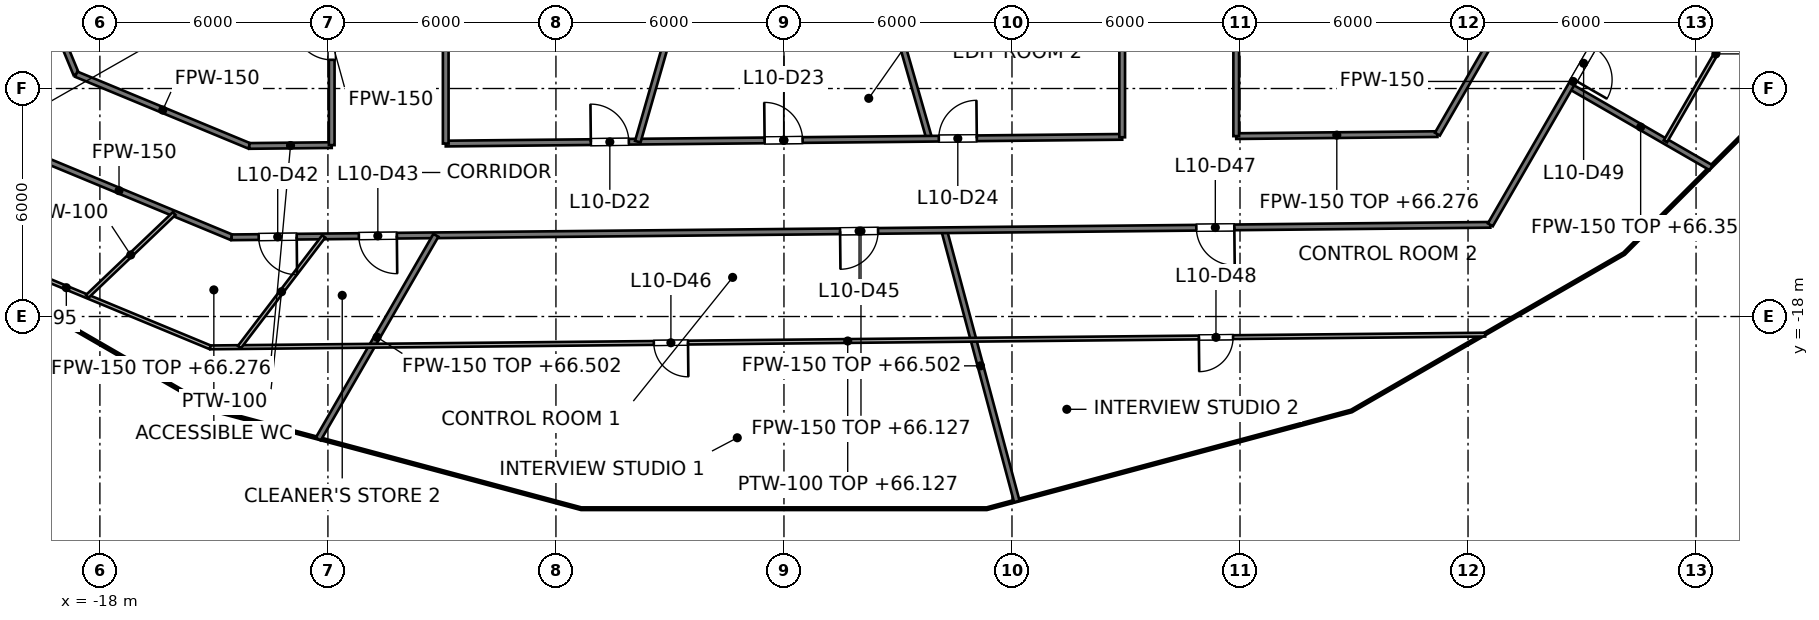
"""IFC4 building model, lengths in metres.
Left out: names, types, materials, properties, quantities, classifications, styles, units other than length and angle.
Written with IfcOpenShell. Run it as: python <this file> out.ifc"""

import sys

from ifc_helpers import new_model, si_unit, direction, frame, frame_2d, origin, place, context, subcontext, project, spatial, rectangle, extrude, element, fill, save


model = new_model("IFC4")
c1 = context("Model", 3, precision=1e-05, world=origin(), true_north=direction((0.0, 1.0)))
c2 = subcontext(c1, "Body", "Model", "MODEL_VIEW")
j1 = project(units=[si_unit("LENGTHUNIT", "METRE"), si_unit("PLANEANGLEUNIT", "RADIAN")], contexts=[c1])
p1 = place(None, origin())
s1 = spatial("IfcSite", under=j1, at=p1, CompositionType="ELEMENT")
p2 = place(p1, origin())
s2 = spatial("IfcBuilding", under=s1, at=p2, CompositionType="ELEMENT")
p3 = place(p2, frame((0.0, 0.0, 63.0)))
s3 = spatial("IfcBuildingStorey", under=s2, at=p3, CompositionType="ELEMENT", Elevation=63.0)
p4 = place(p3, frame((4.215, -15.73, 0.0), z_axis=(0.0, 0.0, 1.0), x_axis=(0.258791697498, -0.965933153643, 0.0)))
e1 = element("IfcWall", 1, at=p4, inside=s3, PredefinedType="PARTITIONING", context=c2, shape_type="SweptSolid", body=[
    extrude(rectangle(XDim=7.388, YDim=0.15, at=frame_2d((3.694, 0.0))), origin(), (0.0, 0.0, 1.0), 3.502),
])
p5 = place(p3, frame((2.296, -8.0, 0.0), z_axis=(0.0, 0.0, 1.0), x_axis=(0.275935525478, -0.961176147113, 0.0)))
e2 = element("IfcWall", 2, at=p5, inside=s3, PredefinedType="PARTITIONING", context=c2, shape_type="SweptSolid", body=[
    extrude(rectangle(XDim=5.548, YDim=0.15, at=frame_2d((2.774, 0.0))), origin(), (0.0, 0.0, 1.0), 4.05),
])
p6 = place(p3, frame((-20.5, -7.095, 0.0), z_axis=(0.0, 0.0, 1.0), x_axis=(0.382878184095, -0.923798839653, 0.0)))
e3 = element("IfcWall", 3, at=p6, inside=s3, PredefinedType="PARTITIONING", context=c2, shape_type="SweptSolid", body=[
    extrude(rectangle(XDim=4.902, YDim=0.15, at=frame_2d((2.451, 0.0))), origin(), (0.0, 0.0, 1.0), 3.276),
])
p7 = place(p3, frame((20.69, -11.945, 0.0), z_axis=(0.0, 0.0, 1.0), x_axis=(0.866028755976, -0.499994193788, 0.0)))
e4 = element("IfcWall", 4, at=p7, inside=s3, PredefinedType="PARTITIONING", context=c2, shape_type="SweptSolid", body=[
    extrude(rectangle(XDim=4.277, YDim=0.15, at=frame_2d((2.139, 0.0))), origin(), (0.0, 0.0, 1.0), 3.352),
])
p8 = place(p3, frame((-20.46, -13.46, 0.0), z_axis=(0.0, 0.0, 1.0), x_axis=(0.923801547606, -0.382871650349, 0.0)))
e5 = element("IfcWall", 5, at=p8, inside=s3, PredefinedType="PARTITIONING", context=c2, shape_type="SweptSolid", body=[
    extrude(rectangle(XDim=6.415, YDim=0.15, at=frame_2d((3.208, 0.0))), origin(), (0.0, 0.0, 1.0), 3.195),
])
p9 = place(p3, frame((-18.623, -11.623, 0.0), z_axis=(0.0, 0.0, 1.0), x_axis=(0.923816441303, -0.382835712518, 0.0)))
e6 = element("IfcWall", 6, at=p9, inside=s3, PredefinedType="PARTITIONING", context=c2, shape_type="SweptSolid", body=[
    extrude(rectangle(XDim=4.931, YDim=0.15, at=frame_2d((2.465, 0.0))), origin(), (0.0, 0.0, 1.0), 3.195),
])
p10 = place(p3, frame((-14.534, -15.916, 0.0), z_axis=(0.0, 0.0, 1.0), x_axis=(0.999950637767, 0.009935896005, 0.0)))
e7 = element("IfcWall", 7, at=p10, inside=s3, PredefinedType="PARTITIONING", context=c2, shape_type="SweptSolid", body=[
    extrude(rectangle(XDim=33.123, YDim=0.15, at=frame_2d((16.561, 0.0))), origin(), (0.0, 0.0, 1.0), 3.127),
])
p11 = place(p10, frame((0.713, 0.0, 0.0)))
e8 = element("IfcOpeningElement", 8, at=p11, cuts=e7, PredefinedType="OPENING", context=c2, shape_type="SweptSolid", body=[
    extrude(rectangle(XDim=1.0, YDim=2.1, at=frame_2d((0.5, 1.05))), frame((0.0, 0.075, 0.0), z_axis=(0.0, -1.0, 0.0), x_axis=(1.0, 0.0, 0.0)), (0.0, 0.0, 1.0), 0.15),
])
p12 = place(p10, frame((3.348, 0.0, 0.0)))
e9 = element("IfcOpeningElement", 9, at=p12, cuts=e7, PredefinedType="OPENING", context=c2, shape_type="SweptSolid", body=[
    extrude(rectangle(XDim=1.0, YDim=2.1, at=frame_2d((0.5, 1.05))), frame((0.0, 0.075, 0.0), z_axis=(0.0, -1.0, 0.0), x_axis=(1.0, 0.0, 0.0)), (0.0, 0.0, 1.0), 0.15),
])
p13 = place(p10, frame((16.011, 0.0, 0.0)))
e10 = element("IfcOpeningElement", 10, at=p13, cuts=e7, PredefinedType="OPENING", context=c2, shape_type="SweptSolid", body=[
    extrude(rectangle(XDim=1.0, YDim=2.1, at=frame_2d((0.5, 1.05))), frame((0.0, 0.075, 0.0), z_axis=(0.0, -1.0, 0.0), x_axis=(1.0, 0.0, 0.0)), (0.0, 0.0, 1.0), 0.15),
])
p14 = place(p10, frame((25.386, 0.0, 0.0)))
e11 = element("IfcOpeningElement", 11, at=p14, cuts=e7, PredefinedType="OPENING", context=c2, shape_type="SweptSolid", body=[
    extrude(rectangle(XDim=1.0, YDim=2.1, at=frame_2d((0.5, 1.05))), frame((0.0, 0.075, 0.0), z_axis=(0.0, -1.0, 0.0), x_axis=(1.0, 0.0, 0.0)), (0.0, 0.0, 1.0), 0.15),
])
p15 = place(p3, frame((-14.068, -13.511, 0.0), z_axis=(0.0, 0.0, 1.0), x_axis=(0.999950911515, 0.009908307647, 0.0)))
e12 = element("IfcWall", 12, at=p15, inside=s3, PredefinedType="PARTITIONING", context=c2, shape_type="SweptSolid", body=[
    extrude(rectangle(XDim=2.168, YDim=0.15, at=frame_2d((1.084, 0.0))), origin(), (0.0, 0.0, 1.0), 3.276),
])
p16 = place(p3, frame((-8.9, -13.449, 0.0), z_axis=(0.0, 0.0, 1.0), x_axis=(0.999950697987, 0.009929833562, 0.0)))
e13 = element("IfcWall", 13, at=p16, inside=s3, PredefinedType="PARTITIONING", context=c2, shape_type="SweptSolid", body=[
    extrude(rectangle(XDim=17.801, YDim=0.15, at=frame_2d((8.9, 0.0))), origin(), (0.0, 0.0, 1.0), 3.127),
])
p17 = place(p16, frame((3.818, 0.0, 0.0)))
e14 = element("IfcOpeningElement", 14, at=p17, cuts=e13, PredefinedType="OPENING", context=c2, shape_type="SweptSolid", body=[
    extrude(rectangle(XDim=1.0, YDim=2.1, at=frame_2d((0.5, 1.05))), frame((0.0, 0.075, 0.0), z_axis=(0.0, -1.0, 0.0), x_axis=(1.0, 0.0, 0.0)), (0.0, 0.0, 1.0), 0.15),
])
p18 = place(p16, frame((8.391, 0.0, 0.0)))
e15 = element("IfcOpeningElement", 15, at=p18, cuts=e13, PredefinedType="OPENING", context=c2, shape_type="SweptSolid", body=[
    extrude(rectangle(XDim=1.0, YDim=2.1, at=frame_2d((0.5, 1.05))), frame((0.0, 0.075, 0.0), z_axis=(0.0, -1.0, 0.0), x_axis=(1.0, 0.0, 0.0)), (0.0, 0.0, 1.0), 0.15),
])
p19 = place(p16, frame((12.975, 0.0, 0.0)))
e16 = element("IfcOpeningElement", 16, at=p19, cuts=e13, PredefinedType="OPENING", context=c2, shape_type="SweptSolid", body=[
    extrude(rectangle(XDim=1.0, YDim=2.1, at=frame_2d((0.5, 1.05))), frame((0.0, 0.075, 0.0), z_axis=(0.0, -1.0, 0.0), x_axis=(1.0, 0.0, 0.0)), (0.0, 0.0, 1.0), 0.15),
])
p20 = place(p3, frame((11.9, -13.253, 0.0), z_axis=(0.0, 0.0, 1.0), x_axis=(0.999950853109, 0.009914200296, 0.0)))
e17 = element("IfcWall", 17, at=p20, inside=s3, PredefinedType="PARTITIONING", context=c2, shape_type="SweptSolid", body=[
    extrude(rectangle(XDim=5.294, YDim=0.15, at=frame_2d((2.647, 0.0))), origin(), (0.0, 0.0, 1.0), 3.276),
])
p21 = place(p3, frame((18.587, -15.587, 0.0), z_axis=(0.0, 0.0, 1.0), x_axis=(0.499993286632, 0.866029279715, 0.0)))
e18 = element("IfcWall", 18, at=p21, inside=s3, PredefinedType="PARTITIONING", context=c2, shape_type="SweptSolid", body=[
    extrude(rectangle(XDim=8.713, YDim=0.15, at=frame_2d((4.357, 0.0))), origin(), (0.0, 0.0, 1.0), 3.195),
])
p22 = place(p21, frame((4.408, 0.0, 0.0)))
e19 = element("IfcOpeningElement", 19, at=p22, cuts=e18, PredefinedType="OPENING", context=c2, shape_type="SweptSolid", body=[
    extrude(rectangle(XDim=1.0, YDim=2.1, at=frame_2d((0.5, 1.05))), frame((0.0, 0.075, 0.0), z_axis=(0.0, -1.0, 0.0), x_axis=(1.0, 0.0, 0.0)), (0.0, 0.0, 1.0), 0.15),
])
p23 = place(p3, frame((17.194, -13.201, 0.0), z_axis=(0.0, 0.0, 1.0), x_axis=(0.499983182885, 0.866035112932, 0.0)))
e20 = element("IfcWall", 20, at=p23, inside=s3, PredefinedType="PARTITIONING", context=c2, shape_type="SweptSolid", body=[
    extrude(rectangle(XDim=6.674, YDim=0.15, at=frame_2d((3.337, 0.0))), origin(), (0.0, 0.0, 1.0), 3.195),
])
p24 = place(p23, frame((2.834, 0.0, 0.0)))
e21 = element("IfcOpeningElement", 21, at=p24, cuts=e20, PredefinedType="OPENING", context=c2, shape_type="SweptSolid", body=[
    extrude(rectangle(XDim=1.0, YDim=2.1, at=frame_2d((0.5, 1.05))), frame((0.0, 0.075, 0.0), z_axis=(0.0, -1.0, 0.0), x_axis=(1.0, 0.0, 0.0)), (0.0, 0.0, 1.0), 0.15),
])
p25 = place(p3, frame((-12.254, -21.224, 0.0), z_axis=(0.0, 0.0, 1.0), x_axis=(0.499969398072, 0.866043071095, 0.0)))
e22 = element("IfcWall", 22, at=p25, inside=s3, PredefinedType="PARTITIONING", context=c2, shape_type="SweptSolid", body=[
    extrude(rectangle(XDim=6.19, YDim=0.15, at=frame_2d((3.095, 0.0))), origin(), (0.0, 0.0, 1.0), 3.502),
])
p26 = place(p3, frame((-3.846, -13.399, 0.0), z_axis=(0.0, 0.0, 1.0), x_axis=(0.275914969745, 0.961182048038, 0.0)))
e23 = element("IfcWall", 23, at=p26, inside=s3, PredefinedType="PARTITIONING", context=c2, shape_type="SweptSolid", body=[
    extrude(rectangle(XDim=5.617, YDim=0.15, at=frame_2d((2.809, 0.0))), origin(), (0.0, 0.0, 1.0), 4.05),
])
p27 = place(p3, frame((11.9, -13.253, 0.0), z_axis=(0.0, 0.0, 1.0), x_axis=(0.0, 1.0, 0.0)))
e24 = element("IfcWall", 24, at=p27, inside=s3, PredefinedType="PARTITIONING", context=c2, shape_type="SweptSolid", body=[
    extrude(rectangle(XDim=5.253, YDim=0.15, at=frame_2d((2.626, 0.0))), origin(), (0.0, 0.0, 1.0), 3.195),
])
p28 = place(p3, frame((8.9, -13.283, 0.0), z_axis=(0.0, 0.0, 1.0), x_axis=(0.0, 1.0, 0.0)))
e25 = element("IfcWall", 25, at=p28, inside=s3, PredefinedType="PARTITIONING", context=c2, shape_type="SweptSolid", body=[
    extrude(rectangle(XDim=5.283, YDim=0.15, at=frame_2d((2.642, 0.0))), origin(), (0.0, 0.0, 1.0), 3.127),
])
p29 = place(p3, frame((-8.9, -13.449, 0.0), z_axis=(0.0, 0.0, 1.0), x_axis=(0.0, 1.0, 0.0)))
e26 = element("IfcWall", 26, at=p29, inside=s3, PredefinedType="PARTITIONING", context=c2, shape_type="SweptSolid", body=[
    extrude(rectangle(XDim=5.449, YDim=0.15, at=frame_2d((2.725, 0.0))), origin(), (0.0, 0.0, 1.0), 3.127),
])
p30 = place(p3, frame((-11.9, -13.49, 0.0), z_axis=(0.0, 0.0, 1.0), x_axis=(0.0, 1.0, 0.0)))
e27 = element("IfcWall", 27, at=p30, inside=s3, PredefinedType="PARTITIONING", context=c2, shape_type="SweptSolid", body=[
    extrude(rectangle(XDim=5.49, YDim=0.15, at=frame_2d((2.745, 0.0))), origin(), (0.0, 0.0, 1.0), 3.195),
])
p31 = place(p30, frame((2.245, 0.0, 0.0)))
e28 = element("IfcOpeningElement", 28, at=p31, cuts=e27, PredefinedType="OPENING", context=c2, shape_type="SweptSolid", body=[
    extrude(rectangle(XDim=1.0, YDim=2.1, at=frame_2d((0.5, 1.05))), frame((0.0, 0.075, 0.0), z_axis=(0.0, -1.0, 0.0), x_axis=(1.0, 0.0, 0.0)), (0.0, 0.0, 1.0), 0.15),
])
p32 = place(p3, frame((-22.672, -15.672, 0.0), z_axis=(0.0, 0.0, 1.0), x_axis=(0.923807088213, -0.382858281572, 0.0)))
e29 = element("IfcWall", 29, at=p32, inside=s3, PredefinedType="PARTITIONING", context=c2, shape_type="SweptSolid", body=[
    extrude(rectangle(XDim=8.202, YDim=0.1, at=frame_2d((4.101, 0.0))), origin(), (0.0, 0.0, 1.0), 3.195),
])
p33 = place(p3, frame((-15.095, -18.812, 0.0), z_axis=(0.0, 0.0, 1.0), x_axis=(0.99995000375, 0.009999500037, 0.0)))
e30 = element("IfcWall", 30, at=p33, inside=s3, PredefinedType="PARTITIONING", context=c2, shape_type="SweptSolid", body=[
    extrude(rectangle(XDim=33.547, YDim=0.1, at=frame_2d((16.773, 0.0))), origin(), (0.0, 0.0, 1.0), 3.127),
])
p34 = place(p33, frame((11.671, 0.0, 0.0)))
e31 = element("IfcOpeningElement", 31, at=p34, cuts=e30, PredefinedType="OPENING", context=c2, shape_type="SweptSolid", body=[
    extrude(rectangle(XDim=0.9, YDim=2.1, at=frame_2d((0.45, 1.05))), frame((0.0, 0.05, 0.0), z_axis=(0.0, -1.0, 0.0), x_axis=(1.0, 0.0, 0.0)), (0.0, 0.0, 1.0), 0.1),
])
p35 = place(p33, frame((26.014, 0.0, 0.0)))
e32 = element("IfcOpeningElement", 32, at=p35, cuts=e30, PredefinedType="OPENING", context=c2, shape_type="SweptSolid", body=[
    extrude(rectangle(XDim=0.9, YDim=2.1, at=frame_2d((0.45, 1.05))), frame((0.0, 0.05, 0.0), z_axis=(0.0, -1.0, 0.0), x_axis=(1.0, 0.0, 0.0)), (0.0, 0.0, 1.0), 0.1),
])
p36 = place(p3, frame((-18.332, -17.47, 0.0), z_axis=(0.0, 0.0, 1.0), x_axis=(0.72386407588, 0.689942606056, 0.0)))
e33 = element("IfcWall", 33, at=p36, inside=s3, PredefinedType="PARTITIONING", context=c2, shape_type="SweptSolid", body=[
    extrude(rectangle(XDim=3.16, YDim=0.1, at=frame_2d((1.58, 0.0))), origin(), (0.0, 0.0, 1.0), 4.05),
])
p37 = place(p3, frame((-14.329, -18.804, 0.0), z_axis=(0.0, 0.0, 1.0), x_axis=(0.606117553719, 0.795375075718, 0.0)))
e34 = element("IfcWall", 34, at=p37, inside=s3, PredefinedType="PARTITIONING", context=c2, shape_type="SweptSolid", body=[
    extrude(rectangle(XDim=3.661, YDim=0.1, at=frame_2d((1.831, 0.0))), origin(), (0.0, 0.0, 1.0), 4.05),
])
p38 = place(p3, frame((23.193, -13.39, 0.0), z_axis=(0.0, 0.0, 1.0), x_axis=(0.500018082969, 0.866014963326, 0.0)))
e35 = element("IfcWall", 35, at=p38, inside=s3, PredefinedType="PARTITIONING", context=c2, shape_type="SweptSolid", body=[
    extrude(rectangle(XDim=5.314, YDim=0.1, at=frame_2d((2.657, 0.0))), origin(), (0.0, 0.0, 1.0), 3.276),
])
p39 = place(p17, origin())
e36 = element("IfcDoor", 36, at=p39, inside=s3, OperationType="SINGLE_SWING_LEFT", PredefinedType="DOOR", context=c2, shape_type="SweptSolid", body=[
    extrude(rectangle(XDim=1.0, YDim=2.1, at=frame_2d((0.5, 1.05))), frame((0.0, 0.025, 0.0), z_axis=(0.0, -1.0, 0.0), x_axis=(1.0, 0.0, 0.0)), (0.0, 0.0, 1.0), 0.05),
])
fill(e14, e36)
p40 = place(p18, origin())
e37 = element("IfcDoor", 37, at=p40, inside=s3, OperationType="SINGLE_SWING_LEFT", PredefinedType="DOOR", context=c2, shape_type="SweptSolid", body=[
    extrude(rectangle(XDim=1.0, YDim=2.1, at=frame_2d((0.5, 1.05))), frame((0.0, 0.025, 0.0), z_axis=(0.0, -1.0, 0.0), x_axis=(1.0, 0.0, 0.0)), (0.0, 0.0, 1.0), 0.05),
])
fill(e15, e37)
p41 = place(p19, origin())
e38 = element("IfcDoor", 38, at=p41, inside=s3, OperationType="SINGLE_SWING_RIGHT", PredefinedType="DOOR", context=c2, shape_type="SweptSolid", body=[
    extrude(rectangle(XDim=1.0, YDim=2.1, at=frame_2d((0.5, 1.05))), frame((0.0, 0.025, 0.0), z_axis=(0.0, -1.0, 0.0), x_axis=(1.0, 0.0, 0.0)), (0.0, 0.0, 1.0), 0.05),
])
fill(e16, e38)
p42 = place(p31, origin())
e39 = element("IfcDoor", 39, at=p42, inside=s3, OperationType="SINGLE_SWING_RIGHT", PredefinedType="DOOR", context=c2, shape_type="SweptSolid", body=[
    extrude(rectangle(XDim=1.0, YDim=2.1, at=frame_2d((0.5, 1.05))), frame((0.0, 0.025, 0.0), z_axis=(0.0, -1.0, 0.0), x_axis=(1.0, 0.0, 0.0)), (0.0, 0.0, 1.0), 0.05),
])
fill(e28, e39)
p43 = place(p11, origin())
e40 = element("IfcDoor", 40, at=p43, inside=s3, OperationType="SINGLE_SWING_RIGHT", PredefinedType="DOOR", context=c2, shape_type="SweptSolid", body=[
    extrude(rectangle(XDim=1.0, YDim=2.1, at=frame_2d((0.5, 1.05))), frame((0.0, 0.025, 0.0), z_axis=(0.0, -1.0, 0.0), x_axis=(1.0, 0.0, 0.0)), (0.0, 0.0, 1.0), 0.05),
])
fill(e8, e40)
p44 = place(p12, origin())
e41 = element("IfcDoor", 41, at=p44, inside=s3, OperationType="SINGLE_SWING_RIGHT", PredefinedType="DOOR", context=c2, shape_type="SweptSolid", body=[
    extrude(rectangle(XDim=1.0, YDim=2.1, at=frame_2d((0.5, 1.05))), frame((0.0, 0.025, 0.0), z_axis=(0.0, -1.0, 0.0), x_axis=(1.0, 0.0, 0.0)), (0.0, 0.0, 1.0), 0.05),
])
fill(e9, e41)
p45 = place(p13, origin())
e42 = element("IfcDoor", 42, at=p45, inside=s3, OperationType="SINGLE_SWING_LEFT", PredefinedType="DOOR", context=c2, shape_type="SweptSolid", body=[
    extrude(rectangle(XDim=1.0, YDim=2.1, at=frame_2d((0.5, 1.05))), frame((0.0, 0.025, 0.0), z_axis=(0.0, -1.0, 0.0), x_axis=(1.0, 0.0, 0.0)), (0.0, 0.0, 1.0), 0.05),
])
fill(e10, e42)
p46 = place(p34, origin())
e43 = element("IfcDoor", 43, at=p46, inside=s3, OperationType="SINGLE_SWING_RIGHT", PredefinedType="DOOR", context=c2, shape_type="SweptSolid", body=[
    extrude(rectangle(XDim=0.9, YDim=2.1, at=frame_2d((0.45, 1.05))), frame((0.0, 0.025, 0.0), z_axis=(0.0, -1.0, 0.0), x_axis=(1.0, 0.0, 0.0)), (0.0, 0.0, 1.0), 0.05),
])
fill(e31, e43)
p47 = place(p14, origin())
e44 = element("IfcDoor", 44, at=p47, inside=s3, OperationType="SINGLE_SWING_RIGHT", PredefinedType="DOOR", context=c2, shape_type="SweptSolid", body=[
    extrude(rectangle(XDim=1.0, YDim=2.1, at=frame_2d((0.5, 1.05))), frame((0.0, 0.025, 0.0), z_axis=(0.0, -1.0, 0.0), x_axis=(1.0, 0.0, 0.0)), (0.0, 0.0, 1.0), 0.05),
])
fill(e11, e44)
p48 = place(p35, origin())
e45 = element("IfcDoor", 45, at=p48, inside=s3, OperationType="SINGLE_SWING_LEFT", PredefinedType="DOOR", context=c2, shape_type="SweptSolid", body=[
    extrude(rectangle(XDim=0.9, YDim=2.1, at=frame_2d((0.45, 1.05))), frame((0.0, 0.025, 0.0), z_axis=(0.0, -1.0, 0.0), x_axis=(1.0, 0.0, 0.0)), (0.0, 0.0, 1.0), 0.05),
])
fill(e32, e45)
p49 = place(p22, origin())
e46 = element("IfcDoor", 46, at=p49, inside=s3, OperationType="SINGLE_SWING_LEFT", PredefinedType="DOOR", context=c2, shape_type="SweptSolid", body=[
    extrude(rectangle(XDim=1.0, YDim=2.1, at=frame_2d((0.5, 1.05))), frame((0.0, 0.025, 0.0), z_axis=(0.0, -1.0, 0.0), x_axis=(1.0, 0.0, 0.0)), (0.0, 0.0, 1.0), 0.05),
])
fill(e19, e46)
save(model, sys.argv[1])
